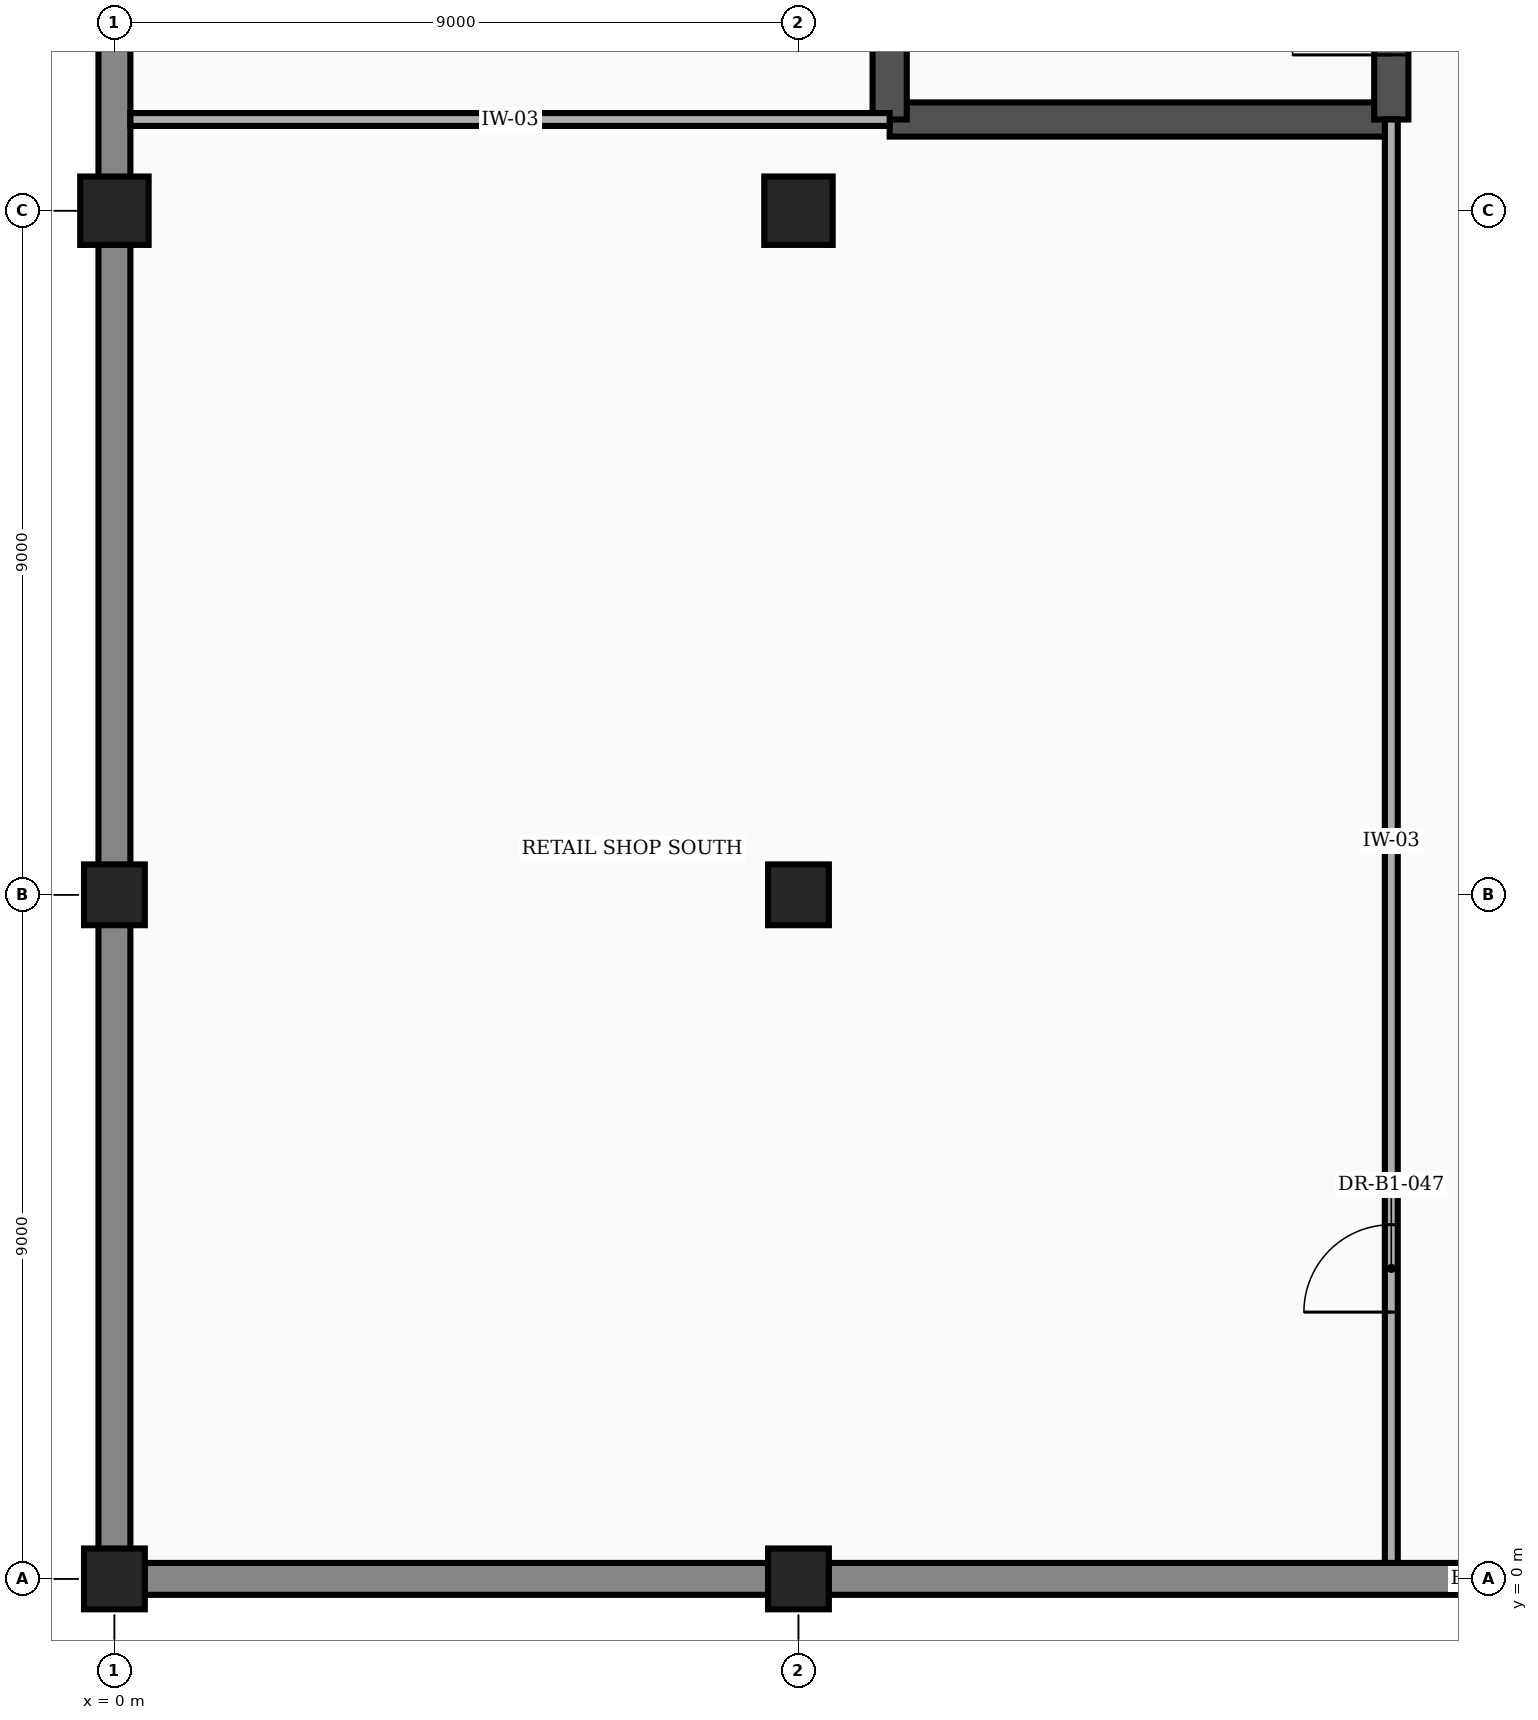
"""IFC4 building model, lengths in metres.
Left out: names, types, materials, properties, quantities, classifications, styles, units other than length and angle.
Written with IfcOpenShell. Run it as: python <this file> out.ifc"""

import sys

from ifc_helpers import new_model, si_unit, direction, frame, frame_2d, origin, origin_2d, place, context, subcontext, project, spatial, rectangle, extrude, element, fill, save


model = new_model("IFC4")
c1 = context("Model", 3, precision=1e-05, world=origin(), true_north=direction((0.0, 1.0)))
c2 = subcontext(c1, "Body", "Model", "MODEL_VIEW")
j1 = project(units=[si_unit("LENGTHUNIT", "METRE"), si_unit("PLANEANGLEUNIT", "RADIAN")], contexts=[c1])
p1 = place(None, origin())
s1 = spatial("IfcSite", under=j1, at=p1, CompositionType="ELEMENT")
p2 = place(p1, origin())
s2 = spatial("IfcBuilding", under=s1, at=p2, CompositionType="ELEMENT")
p3 = place(p2, frame((0.0, 0.0, -4.5)))
s3 = spatial("IfcBuildingStorey", under=s2, at=p3, CompositionType="ELEMENT", Elevation=-4.5)
for number, where, z_axis, x_axis in (
    (1, (0.0, 0.0, -0.45), (0.0, 0.0, 1.0), (1.0, 0.0, 0.0)),
    (2, (0.0, 9.0, -0.45), (0.0, 0.0, 1.0), (1.0, 0.0, 0.0)),
):
    element("IfcColumn", number, at=place(p3, frame(where, z_axis=z_axis, x_axis=x_axis)), inside=s3, PredefinedType="COLUMN", context=c2, shape_type="SweptSolid", body=[
        extrude(rectangle(XDim=0.8, YDim=0.8, at=origin_2d()), origin(), (0.0, 0.0, 1.0), 4.95),
    ])
p4 = place(p3, frame((0.0, 18.0, -0.45), z_axis=(0.0, 0.0, 1.0), x_axis=(1.0, 0.0, 0.0)))
e3 = element("IfcColumn", 3, at=p4, inside=s3, PredefinedType="COLUMN", context=c2, shape_type="SweptSolid", body=[
    extrude(rectangle(XDim=0.9, YDim=0.9, at=origin_2d()), origin(), (0.0, 0.0, 1.0), 4.95),
])
for number, where, z_axis, x_axis in (
    (4, (9.0, 0.0, -0.45), (0.0, 0.0, 1.0), (1.0, 0.0, 0.0)),
    (5, (9.0, 9.0, -0.45), (0.0, 0.0, 1.0), (1.0, 0.0, 0.0)),
):
    element("IfcColumn", number, at=place(p3, frame(where, z_axis=z_axis, x_axis=x_axis)), inside=s3, PredefinedType="COLUMN", context=c2, shape_type="SweptSolid", body=[
        extrude(rectangle(XDim=0.8, YDim=0.8, at=origin_2d()), origin(), (0.0, 0.0, 1.0), 4.95),
    ])
p5 = place(p3, frame((9.0, 18.0, -0.45), z_axis=(0.0, 0.0, 1.0), x_axis=(1.0, 0.0, 0.0)))
e6 = element("IfcColumn", 6, at=p5, inside=s3, PredefinedType="COLUMN", context=c2, shape_type="SweptSolid", body=[
    extrude(rectangle(XDim=0.9, YDim=0.9, at=origin_2d()), origin(), (0.0, 0.0, 1.0), 4.95),
])
p6 = place(p3, frame((0.392, 0.0, 0.0), z_axis=(0.0, 0.0, 1.0), x_axis=(1.0, 0.0, 0.0)))
e7 = element("IfcWall", 7, at=p6, inside=s3, PredefinedType="STANDARD", context=c2, shape_type="SweptSolid", body=[
    extrude(rectangle(XDim=8.216, YDim=0.42, at=frame_2d((4.108, 0.0))), origin(), (0.0, 0.0, 1.0), 3.7),
])
p7 = place(p3, frame((9.392, 0.0, 0.0), z_axis=(0.0, 0.0, 1.0), x_axis=(1.0, 0.0, 0.0)))
e8 = element("IfcWall", 8, at=p7, inside=s3, PredefinedType="STANDARD", context=c2, shape_type="SweptSolid", body=[
    extrude(rectangle(XDim=17.216, YDim=0.42, at=frame_2d((8.608, 0.0))), origin(), (0.0, 0.0, 1.0), 3.7),
])
p8 = place(p3, frame((0.0, 0.392, 0.0), z_axis=(0.0, 0.0, 1.0), x_axis=(0.0, 1.0, 0.0)))
e9 = element("IfcWall", 9, at=p8, inside=s3, PredefinedType="STANDARD", context=c2, shape_type="SweptSolid", body=[
    extrude(rectangle(XDim=8.216, YDim=0.42, at=frame_2d((4.108, 0.0))), origin(), (0.0, 0.0, 1.0), 3.7),
])
p9 = place(p3, frame((0.0, 9.392, 0.0), z_axis=(0.0, 0.0, 1.0), x_axis=(0.0, 1.0, 0.0)))
e10 = element("IfcWall", 10, at=p9, inside=s3, PredefinedType="STANDARD", context=c2, shape_type="SweptSolid", body=[
    extrude(rectangle(XDim=8.166, YDim=0.42, at=frame_2d((4.083, 0.0))), origin(), (0.0, 0.0, 1.0), 3.7),
])
p10 = place(p3, frame((0.0, 18.442, 0.0), z_axis=(0.0, 0.0, 1.0), x_axis=(0.0, 1.0, 0.0)))
e11 = element("IfcWall", 11, at=p10, inside=s3, PredefinedType="STANDARD", context=c2, shape_type="SweptSolid", body=[
    extrude(rectangle(XDim=17.116, YDim=0.42, at=frame_2d((8.558, 0.0))), origin(), (0.0, 0.0, 1.0), 3.7),
])
p11 = place(p3, frame((10.2, 19.2, 0.0), z_axis=(0.0, 0.0, 1.0), x_axis=(1.0, 0.0, 0.0)))
e12 = element("IfcWall", 12, at=p11, inside=s3, PredefinedType="SHEAR", context=c2, shape_type="SweptSolid", body=[
    extrude(rectangle(XDim=6.6, YDim=0.45, at=frame_2d((3.3, 0.0))), origin(), (0.0, 0.0, 1.0), 4.24),
])
p12 = place(p3, frame((10.2, 19.2, 0.0), z_axis=(0.0, 0.0, 1.0), x_axis=(0.0, 1.0, 0.0)))
e13 = element("IfcWall", 13, at=p12, inside=s3, PredefinedType="SHEAR", context=c2, shape_type="SweptSolid", body=[
    extrude(rectangle(XDim=15.6, YDim=0.45, at=frame_2d((7.8, 0.0))), origin(), (0.0, 0.0, 1.0), 4.24),
])
p13 = place(p3, frame((16.8, 19.2, 0.0), z_axis=(0.0, 0.0, 1.0), x_axis=(0.0, 1.0, 0.0)))
e14 = element("IfcWall", 14, at=p13, inside=s3, PredefinedType="SHEAR", context=c2, shape_type="SweptSolid", body=[
    extrude(rectangle(XDim=9.585, YDim=0.45, at=frame_2d((4.792, 0.0))), origin(), (0.0, 0.0, 1.0), 4.24),
])
p14 = place(p13, frame((0.85, 0.0, 0.0)))
e15 = element("IfcOpeningElement", 15, at=p14, cuts=e14, PredefinedType="OPENING", context=c2, shape_type="SweptSolid", body=[
    extrude(rectangle(XDim=1.3, YDim=2.2, at=frame_2d((0.65, 1.1))), frame((0.0, 0.237, 0.0), z_axis=(0.0, -1.0, 0.0), x_axis=(1.0, 0.0, 0.0)), (0.0, 0.0, 1.0), 0.474),
])
p15 = place(p3, frame((0.21, 19.2, 0.0), z_axis=(0.0, 0.0, 1.0), x_axis=(1.0, 0.0, 0.0)))
e16 = element("IfcWall", 16, at=p15, inside=s3, PredefinedType="PARTITIONING", context=c2, shape_type="SweptSolid", body=[
    extrude(rectangle(XDim=9.99, YDim=0.17, at=frame_2d((4.995, 0.0))), origin(), (0.0, 0.0, 1.0), 4.24),
])
p16 = place(p3, frame((16.8, 0.21, 0.0), z_axis=(0.0, 0.0, 1.0), x_axis=(0.0, 1.0, 0.0)))
e17 = element("IfcWall", 17, at=p16, inside=s3, PredefinedType="PARTITIONING", context=c2, shape_type="SweptSolid", body=[
    extrude(rectangle(XDim=18.99, YDim=0.17, at=frame_2d((9.495, 0.0))), origin(), (0.0, 0.0, 1.0), 4.24),
])
p17 = place(p16, frame((3.3, 0.0, 0.0)))
e18 = element("IfcOpeningElement", 18, at=p17, cuts=e17, PredefinedType="OPENING", context=c2, shape_type="SweptSolid", body=[
    extrude(rectangle(XDim=1.15, YDim=2.15, at=frame_2d((0.575, 1.075))), frame((0.0, 0.097, 0.0), z_axis=(0.0, -1.0, 0.0), x_axis=(1.0, 0.0, 0.0)), (0.0, 0.0, 1.0), 0.194),
])
p18 = place(p14, origin())
e19 = element("IfcDoor", 19, at=p18, inside=s3, OperationType="SINGLE_SWING_LEFT", PredefinedType="DOOR", context=c2, shape_type="SweptSolid", body=[
    extrude(rectangle(XDim=1.3, YDim=2.2, at=frame_2d((0.65, 1.1))), frame((0.0, 0.025, 0.0), z_axis=(0.0, -1.0, 0.0), x_axis=(1.0, 0.0, 0.0)), (0.0, 0.0, 1.0), 0.05),
])
fill(e15, e19)
p19 = place(p17, origin())
e20 = element("IfcDoor", 20, at=p19, inside=s3, OperationType="SINGLE_SWING_LEFT", PredefinedType="DOOR", context=c2, shape_type="SweptSolid", body=[
    extrude(rectangle(XDim=1.15, YDim=2.15, at=frame_2d((0.575, 1.075))), frame((0.0, 0.025, 0.0), z_axis=(0.0, -1.0, 0.0), x_axis=(1.0, 0.0, 0.0)), (0.0, 0.0, 1.0), 0.05),
])
fill(e18, e20)
save(model, sys.argv[1])
